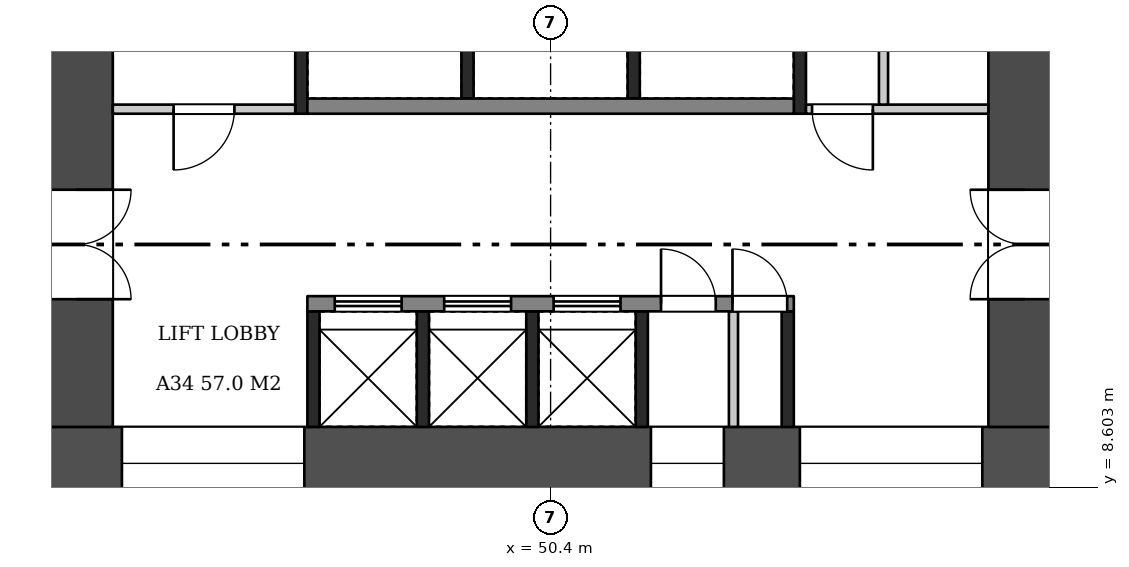
"""IFC4 building model, lengths in metres.
Left out: names, types, materials, properties, quantities, classifications, styles, units other than length and angle.
Written with IfcOpenShell. Run it as: python <this file> out.ifc"""

import sys

from ifc_helpers import new_model, si_unit, direction, frame, frame_2d, origin, place, context, subcontext, project, spatial, rectangle, extrude, element, fill, save


model = new_model("IFC4")
c1 = context("Model", 3, precision=1e-05, world=origin(), true_north=direction((0.0, 1.0)))
c2 = subcontext(c1, "Body", "Model", "MODEL_VIEW")
j1 = project(units=[si_unit("LENGTHUNIT", "METRE"), si_unit("PLANEANGLEUNIT", "RADIAN")], contexts=[c1])
p1 = place(None, origin())
s1 = spatial("IfcSite", under=j1, at=p1, CompositionType="ELEMENT")
p2 = place(p1, origin())
s2 = spatial("IfcBuilding", under=s1, at=p2, CompositionType="ELEMENT")
p3 = place(p2, frame((0.0, 0.0, 133.7)))
s3 = spatial("IfcBuildingStorey", under=s2, at=p3, CompositionType="ELEMENT", Elevation=133.7)
p4 = place(p3, frame((42.0, 9.0, 0.0), z_axis=(0.0, 0.0, 1.0), x_axis=(1.0, 0.0, 0.0)))
e1 = element("IfcWall", 1, at=p4, inside=s3, PredefinedType="SHEAR", context=c2, shape_type="SweptSolid", body=[
    extrude(rectangle(XDim=16.8, YDim=1.2, at=frame_2d((8.4, 0.0))), origin(), (0.0, 0.0, 1.0), 3.22),
])
p5 = place(p4, frame((1.35, 0.0, 0.6)))
e2 = element("IfcOpeningElement", 2, at=p5, cuts=e1, PredefinedType="OPENING", context=c2, shape_type="SweptSolid", body=[
    extrude(rectangle(XDim=3.0, YDim=2.1, at=frame_2d((1.5, 1.05))), frame((0.0, 0.61, 0.0), z_axis=(0.0, -1.0, 0.0), x_axis=(1.0, 0.0, 0.0)), (0.0, 0.0, 1.0), 1.22),
])
p6 = place(p4, frame((10.05, 0.0, 1.6)))
e3 = element("IfcOpeningElement", 3, at=p6, cuts=e1, PredefinedType="OPENING", context=c2, shape_type="SweptSolid", body=[
    extrude(rectangle(XDim=1.2, YDim=1.2, at=frame_2d((0.6, 0.6))), frame((0.0, 0.61, 0.0), z_axis=(0.0, -1.0, 0.0), x_axis=(1.0, 0.0, 0.0)), (0.0, 0.0, 1.0), 1.22),
])
p7 = place(p4, frame((12.5, 0.0, 0.6)))
e4 = element("IfcOpeningElement", 4, at=p7, cuts=e1, PredefinedType="OPENING", context=c2, shape_type="SweptSolid", body=[
    extrude(rectangle(XDim=3.0, YDim=2.1, at=frame_2d((1.5, 1.05))), frame((0.0, 0.61, 0.0), z_axis=(0.0, -1.0, 0.0), x_axis=(1.0, 0.0, 0.0)), (0.0, 0.0, 1.0), 1.22),
])
p8 = place(p3, frame((42.6, 9.6, 0.0), z_axis=(0.0, 0.0, 1.0), x_axis=(0.0, 1.0, 0.0)))
e5 = element("IfcWall", 5, at=p8, inside=s3, PredefinedType="SHEAR", context=c2, shape_type="SweptSolid", body=[
    extrude(rectangle(XDim=14.4, YDim=1.2, at=frame_2d((7.2, 0.0))), origin(), (0.0, 0.0, 1.0), 3.22),
])
p9 = place(p8, frame((2.1, 0.0, 0.0)))
e6 = element("IfcOpeningElement", 6, at=p9, cuts=e5, PredefinedType="OPENING", context=c2, shape_type="SweptSolid", body=[
    extrude(rectangle(XDim=1.8, YDim=2.1, at=frame_2d((0.9, 1.05))), frame((0.0, 0.61, 0.0), z_axis=(0.0, -1.0, 0.0), x_axis=(1.0, 0.0, 0.0)), (0.0, 0.0, 1.0), 1.22),
])
p10 = place(p3, frame((58.2, 9.6, 0.0), z_axis=(0.0, 0.0, 1.0), x_axis=(0.0, 1.0, 0.0)))
e7 = element("IfcWall", 7, at=p10, inside=s3, PredefinedType="SHEAR", context=c2, shape_type="SweptSolid", body=[
    extrude(rectangle(XDim=14.4, YDim=1.2, at=frame_2d((7.2, 0.0))), origin(), (0.0, 0.0, 1.0), 3.22),
])
p11 = place(p10, frame((2.1, 0.0, 0.0)))
e8 = element("IfcOpeningElement", 8, at=p11, cuts=e7, PredefinedType="OPENING", context=c2, shape_type="SweptSolid", body=[
    extrude(rectangle(XDim=1.8, YDim=2.1, at=frame_2d((0.9, 1.05))), frame((0.0, 0.61, 0.0), z_axis=(0.0, -1.0, 0.0), x_axis=(1.0, 0.0, 0.0)), (0.0, 0.0, 1.0), 1.22),
])
for number, where, z_axis, x_axis in (
    (9, (46.5, 9.6, 0.0), (0.0, 0.0, 1.0), (0.0, 1.0, 0.0)),
    (10, (48.3, 9.6, 0.0), (0.0, 0.0, 1.0), (0.0, 1.0, 0.0)),
    (11, (50.1, 9.6, 0.0), (0.0, 0.0, 1.0), (0.0, 1.0, 0.0)),
    (12, (51.9, 9.6, 0.0), (0.0, 0.0, 1.0), (0.0, 1.0, 0.0)),
    (13, (54.3, 9.6, 0.0), (0.0, 0.0, 1.0), (0.0, 1.0, 0.0)),
):
    element("IfcWall", number, at=place(p3, frame(where, z_axis=z_axis, x_axis=x_axis)), inside=s3, PredefinedType="SHEAR", context=c2, shape_type="SweptSolid", body=[
        extrude(rectangle(XDim=1.9, YDim=0.2, at=frame_2d((0.95, 0.0))), origin(), (0.0, 0.0, 1.0), 3.22),
    ])
p12 = place(p3, frame((53.407, 9.6, 0.0), z_axis=(0.0, 0.0, 1.0), x_axis=(0.0, 1.0, 0.0)))
e14 = element("IfcWall", 14, at=p12, inside=s3, PredefinedType="PARTITIONING", context=c2, shape_type="SweptSolid", body=[
    extrude(rectangle(XDim=1.9, YDim=0.15, at=frame_2d((0.95, 0.0))), origin(), (0.0, 0.0, 1.0), 3.22),
])
p13 = place(p3, frame((46.4, 11.625, 0.0), z_axis=(0.0, 0.0, 1.0), x_axis=(1.0, 0.0, 0.0)))
e15 = element("IfcWall", 15, at=p13, inside=s3, PredefinedType="SHEAR", context=c2, shape_type="SweptSolid", body=[
    extrude(rectangle(XDim=8.0, YDim=0.25, at=frame_2d((4.0, 0.0))), origin(), (0.0, 0.0, 1.0), 3.22),
])
p14 = place(p13, frame((0.45, 0.0, 0.0)))
e16 = element("IfcOpeningElement", 16, at=p14, cuts=e15, PredefinedType="OPENING", context=c2, shape_type="SweptSolid", body=[
    extrude(rectangle(XDim=1.1, YDim=2.1, at=frame_2d((0.55, 1.05))), frame((0.0, 0.135, 0.0), z_axis=(0.0, -1.0, 0.0), x_axis=(1.0, 0.0, 0.0)), (0.0, 0.0, 1.0), 0.27),
])
p15 = place(p13, frame((2.25, 0.0, 0.0)))
e17 = element("IfcOpeningElement", 17, at=p15, cuts=e15, PredefinedType="OPENING", context=c2, shape_type="SweptSolid", body=[
    extrude(rectangle(XDim=1.1, YDim=2.1, at=frame_2d((0.55, 1.05))), frame((0.0, 0.135, 0.0), z_axis=(0.0, -1.0, 0.0), x_axis=(1.0, 0.0, 0.0)), (0.0, 0.0, 1.0), 0.27),
])
p16 = place(p13, frame((4.05, 0.0, 0.0)))
e18 = element("IfcOpeningElement", 18, at=p16, cuts=e15, PredefinedType="OPENING", context=c2, shape_type="SweptSolid", body=[
    extrude(rectangle(XDim=1.1, YDim=2.1, at=frame_2d((0.55, 1.05))), frame((0.0, 0.135, 0.0), z_axis=(0.0, -1.0, 0.0), x_axis=(1.0, 0.0, 0.0)), (0.0, 0.0, 1.0), 0.27),
])
p17 = place(p13, frame((5.816, 0.0, 0.0)))
e19 = element("IfcOpeningElement", 19, at=p17, cuts=e15, PredefinedType="OPENING", context=c2, shape_type="SweptSolid", body=[
    extrude(rectangle(XDim=0.9, YDim=2.1, at=frame_2d((0.45, 1.05))), frame((0.0, 0.135, 0.0), z_axis=(0.0, -1.0, 0.0), x_axis=(1.0, 0.0, 0.0)), (0.0, 0.0, 1.0), 0.27),
])
p18 = place(p13, frame((6.991, 0.0, 0.0)))
e20 = element("IfcOpeningElement", 20, at=p18, cuts=e15, PredefinedType="OPENING", context=c2, shape_type="SweptSolid", body=[
    extrude(rectangle(XDim=0.9, YDim=2.1, at=frame_2d((0.45, 1.05))), frame((0.0, 0.135, 0.0), z_axis=(0.0, -1.0, 0.0), x_axis=(1.0, 0.0, 0.0)), (0.0, 0.0, 1.0), 0.27),
])
for number, where, z_axis, x_axis in (
    (21, (49.033, 15.0, 0.0), (0.0, 0.0, 1.0), (0.0, 1.0, 0.0)),
    (22, (51.767, 15.0, 0.0), (0.0, 0.0, 1.0), (0.0, 1.0, 0.0)),
):
    element("IfcWall", number, at=place(p3, frame(where, z_axis=z_axis, x_axis=x_axis)), inside=s3, PredefinedType="SHEAR", context=c2, shape_type="SweptSolid", body=[
        extrude(rectangle(XDim=1.9, YDim=0.2, at=frame_2d((0.95, 0.0))), origin(), (0.0, 0.0, 1.0), 3.22),
    ])
p19 = place(p3, frame((46.4, 14.875, 0.0), z_axis=(0.0, 0.0, 1.0), x_axis=(1.0, 0.0, 0.0)))
e23 = element("IfcWall", 23, at=p19, inside=s3, PredefinedType="SHEAR", context=c2, shape_type="SweptSolid", body=[
    extrude(rectangle(XDim=8.0, YDim=0.25, at=frame_2d((4.0, 0.0))), origin(), (0.0, 0.0, 1.0), 3.22),
])
p20 = place(p3, frame((46.3, 14.75, 0.0), z_axis=(0.0, 0.0, 1.0), x_axis=(0.0, 1.0, 0.0)))
e24 = element("IfcWall", 24, at=p20, inside=s3, PredefinedType="SHEAR", context=c2, shape_type="SweptSolid", body=[
    extrude(rectangle(XDim=2.4, YDim=0.2, at=frame_2d((1.2, 0.0))), origin(), (0.0, 0.0, 1.0), 3.22),
])
p21 = place(p3, frame((43.2, 14.825, 0.0), z_axis=(0.0, 0.0, 1.0), x_axis=(1.0, 0.0, 0.0)))
e25 = element("IfcWall", 25, at=p21, inside=s3, PredefinedType="PARTITIONING", context=c2, shape_type="SweptSolid", body=[
    extrude(rectangle(XDim=3.0, YDim=0.15, at=frame_2d((1.5, 0.0))), origin(), (0.0, 0.0, 1.0), 3.22),
])
p22 = place(p21, frame((1.0, 0.0, 0.0)))
e26 = element("IfcOpeningElement", 26, at=p22, cuts=e25, PredefinedType="OPENING", context=c2, shape_type="SweptSolid", body=[
    extrude(rectangle(XDim=1.0, YDim=2.1, at=frame_2d((0.5, 1.05))), frame((0.0, 0.085, 0.0), z_axis=(0.0, -1.0, 0.0), x_axis=(1.0, 0.0, 0.0)), (0.0, 0.0, 1.0), 0.17),
])
p23 = place(p3, frame((54.5, 14.75, 0.0), z_axis=(0.0, 0.0, 1.0), x_axis=(0.0, 1.0, 0.0)))
e27 = element("IfcWall", 27, at=p23, inside=s3, PredefinedType="SHEAR", context=c2, shape_type="SweptSolid", body=[
    extrude(rectangle(XDim=9.25, YDim=0.2, at=frame_2d((4.625, 0.0))), origin(), (0.0, 0.0, 1.0), 3.22),
])
p24 = place(p3, frame((54.6, 14.825, 0.0), z_axis=(0.0, 0.0, 1.0), x_axis=(1.0, 0.0, 0.0)))
e28 = element("IfcWall", 28, at=p24, inside=s3, PredefinedType="PARTITIONING", context=c2, shape_type="SweptSolid", body=[
    extrude(rectangle(XDim=3.0, YDim=0.15, at=frame_2d((1.5, 0.0))), origin(), (0.0, 0.0, 1.0), 3.22),
])
p25 = place(p24, frame((0.1, 0.0, 0.0)))
e29 = element("IfcOpeningElement", 29, at=p25, cuts=e28, PredefinedType="OPENING", context=c2, shape_type="SweptSolid", body=[
    extrude(rectangle(XDim=1.0, YDim=2.1, at=frame_2d((0.5, 1.05))), frame((0.0, 0.085, 0.0), z_axis=(0.0, -1.0, 0.0), x_axis=(1.0, 0.0, 0.0)), (0.0, 0.0, 1.0), 0.17),
])
p26 = place(p3, frame((55.875, 14.9, 0.0), z_axis=(0.0, 0.0, 1.0), x_axis=(0.0, 1.0, 0.0)))
e30 = element("IfcWall", 30, at=p26, inside=s3, PredefinedType="PARTITIONING", context=c2, shape_type="SweptSolid", body=[
    extrude(rectangle(XDim=9.1, YDim=0.15, at=frame_2d((4.55, 0.0))), origin(), (0.0, 0.0, 1.0), 3.22),
])
p27 = place(p26, frame((2.633, 0.0, 0.0)))
e31 = element("IfcOpeningElement", 31, at=p27, cuts=e30, PredefinedType="OPENING", context=c2, shape_type="SweptSolid", body=[
    extrude(rectangle(XDim=1.0, YDim=2.1, at=frame_2d((0.5, 1.05))), frame((0.0, 0.085, 0.0), z_axis=(0.0, -1.0, 0.0), x_axis=(1.0, 0.0, 0.0)), (0.0, 0.0, 1.0), 0.17),
])
p28 = place(p26, frame((7.308, 0.0, 0.0)))
e32 = element("IfcOpeningElement", 32, at=p28, cuts=e30, PredefinedType="OPENING", context=c2, shape_type="SweptSolid", body=[
    extrude(rectangle(XDim=0.9, YDim=2.1, at=frame_2d((0.45, 1.05))), frame((0.0, 0.085, 0.0), z_axis=(0.0, -1.0, 0.0), x_axis=(1.0, 0.0, 0.0)), (0.0, 0.0, 1.0), 0.17),
])
p29 = place(p9, frame((1.8, 0.0, 0.0), z_axis=(0.0, 0.0, 1.0), x_axis=(-1.0, 0.0, 0.0)))
e33 = element("IfcDoor", 33, at=p29, inside=s3, OperationType="DOUBLE_DOOR_SINGLE_SWING", PredefinedType="DOOR", context=c2, shape_type="SweptSolid", body=[
    extrude(rectangle(XDim=1.8, YDim=2.1, at=frame_2d((0.9, 1.05))), frame((0.0, 0.025, 0.0), z_axis=(0.0, -1.0, 0.0), x_axis=(1.0, 0.0, 0.0)), (0.0, 0.0, 1.0), 0.05),
])
fill(e6, e33)
p30 = place(p11, origin())
e34 = element("IfcDoor", 34, at=p30, inside=s3, OperationType="DOUBLE_DOOR_SINGLE_SWING", PredefinedType="DOOR", context=c2, shape_type="SweptSolid", body=[
    extrude(rectangle(XDim=1.8, YDim=2.1, at=frame_2d((0.9, 1.05))), frame((0.0, 0.025, 0.0), z_axis=(0.0, -1.0, 0.0), x_axis=(1.0, 0.0, 0.0)), (0.0, 0.0, 1.0), 0.05),
])
fill(e8, e34)
p31 = place(p14, origin())
e35 = element("IfcDoor", 35, at=p31, inside=s3, OperationType="DOUBLE_DOOR_SLIDING", PredefinedType="DOOR", context=c2, shape_type="SweptSolid", body=[
    extrude(rectangle(XDim=1.1, YDim=2.1, at=frame_2d((0.55, 1.05))), frame((0.0, 0.025, 0.0), z_axis=(0.0, -1.0, 0.0), x_axis=(1.0, 0.0, 0.0)), (0.0, 0.0, 1.0), 0.05),
])
fill(e16, e35)
p32 = place(p15, origin())
e36 = element("IfcDoor", 36, at=p32, inside=s3, OperationType="DOUBLE_DOOR_SLIDING", PredefinedType="DOOR", context=c2, shape_type="SweptSolid", body=[
    extrude(rectangle(XDim=1.1, YDim=2.1, at=frame_2d((0.55, 1.05))), frame((0.0, 0.025, 0.0), z_axis=(0.0, -1.0, 0.0), x_axis=(1.0, 0.0, 0.0)), (0.0, 0.0, 1.0), 0.05),
])
fill(e17, e36)
p33 = place(p16, origin())
e37 = element("IfcDoor", 37, at=p33, inside=s3, OperationType="DOUBLE_DOOR_SLIDING", PredefinedType="DOOR", context=c2, shape_type="SweptSolid", body=[
    extrude(rectangle(XDim=1.1, YDim=2.1, at=frame_2d((0.55, 1.05))), frame((0.0, 0.025, 0.0), z_axis=(0.0, -1.0, 0.0), x_axis=(1.0, 0.0, 0.0)), (0.0, 0.0, 1.0), 0.05),
])
fill(e18, e37)
p34 = place(p17, origin())
e38 = element("IfcDoor", 38, at=p34, inside=s3, OperationType="SINGLE_SWING_LEFT", PredefinedType="DOOR", context=c2, shape_type="SweptSolid", body=[
    extrude(rectangle(XDim=0.9, YDim=2.1, at=frame_2d((0.45, 1.05))), frame((0.0, 0.025, 0.0), z_axis=(0.0, -1.0, 0.0), x_axis=(1.0, 0.0, 0.0)), (0.0, 0.0, 1.0), 0.05),
])
fill(e19, e38)
p35 = place(p18, origin())
e39 = element("IfcDoor", 39, at=p35, inside=s3, OperationType="SINGLE_SWING_LEFT", PredefinedType="DOOR", context=c2, shape_type="SweptSolid", body=[
    extrude(rectangle(XDim=0.9, YDim=2.1, at=frame_2d((0.45, 1.05))), frame((0.0, 0.025, 0.0), z_axis=(0.0, -1.0, 0.0), x_axis=(1.0, 0.0, 0.0)), (0.0, 0.0, 1.0), 0.05),
])
fill(e20, e39)
p36 = place(p22, frame((1.0, 0.0, 0.0), z_axis=(0.0, 0.0, 1.0), x_axis=(-1.0, 0.0, 0.0)))
e40 = element("IfcDoor", 40, at=p36, inside=s3, OperationType="SINGLE_SWING_RIGHT", PredefinedType="DOOR", context=c2, shape_type="SweptSolid", body=[
    extrude(rectangle(XDim=1.0, YDim=2.1, at=frame_2d((0.5, 1.05))), frame((0.0, 0.025, 0.0), z_axis=(0.0, -1.0, 0.0), x_axis=(1.0, 0.0, 0.0)), (0.0, 0.0, 1.0), 0.05),
])
fill(e26, e40)
p37 = place(p25, frame((1.0, 0.0, 0.0), z_axis=(0.0, 0.0, 1.0), x_axis=(-1.0, 0.0, 0.0)))
e41 = element("IfcDoor", 41, at=p37, inside=s3, OperationType="SINGLE_SWING_LEFT", PredefinedType="DOOR", context=c2, shape_type="SweptSolid", body=[
    extrude(rectangle(XDim=1.0, YDim=2.1, at=frame_2d((0.5, 1.05))), frame((0.0, 0.025, 0.0), z_axis=(0.0, -1.0, 0.0), x_axis=(1.0, 0.0, 0.0)), (0.0, 0.0, 1.0), 0.05),
])
fill(e29, e41)
p38 = place(p5, origin())
e42 = element("IfcWindow", 42, at=p38, inside=s3, PartitioningType="SINGLE_PANEL", PredefinedType="WINDOW", context=c2, shape_type="SweptSolid", body=[
    extrude(rectangle(XDim=3.0, YDim=2.1, at=frame_2d((1.5, 1.05))), frame((0.0, 0.03, 0.0), z_axis=(0.0, -1.0, 0.0), x_axis=(1.0, 0.0, 0.0)), (0.0, 0.0, 1.0), 0.06),
])
fill(e2, e42)
p39 = place(p6, origin())
e43 = element("IfcWindow", 43, at=p39, inside=s3, PartitioningType="SINGLE_PANEL", PredefinedType="WINDOW", context=c2, shape_type="SweptSolid", body=[
    extrude(rectangle(XDim=1.2, YDim=1.2, at=frame_2d((0.6, 0.6))), frame((0.0, 0.03, 0.0), z_axis=(0.0, -1.0, 0.0), x_axis=(1.0, 0.0, 0.0)), (0.0, 0.0, 1.0), 0.06),
])
fill(e3, e43)
p40 = place(p7, origin())
e44 = element("IfcWindow", 44, at=p40, inside=s3, PartitioningType="SINGLE_PANEL", PredefinedType="WINDOW", context=c2, shape_type="SweptSolid", body=[
    extrude(rectangle(XDim=3.0, YDim=2.1, at=frame_2d((1.5, 1.05))), frame((0.0, 0.03, 0.0), z_axis=(0.0, -1.0, 0.0), x_axis=(1.0, 0.0, 0.0)), (0.0, 0.0, 1.0), 0.06),
])
fill(e4, e44)
save(model, sys.argv[1])
